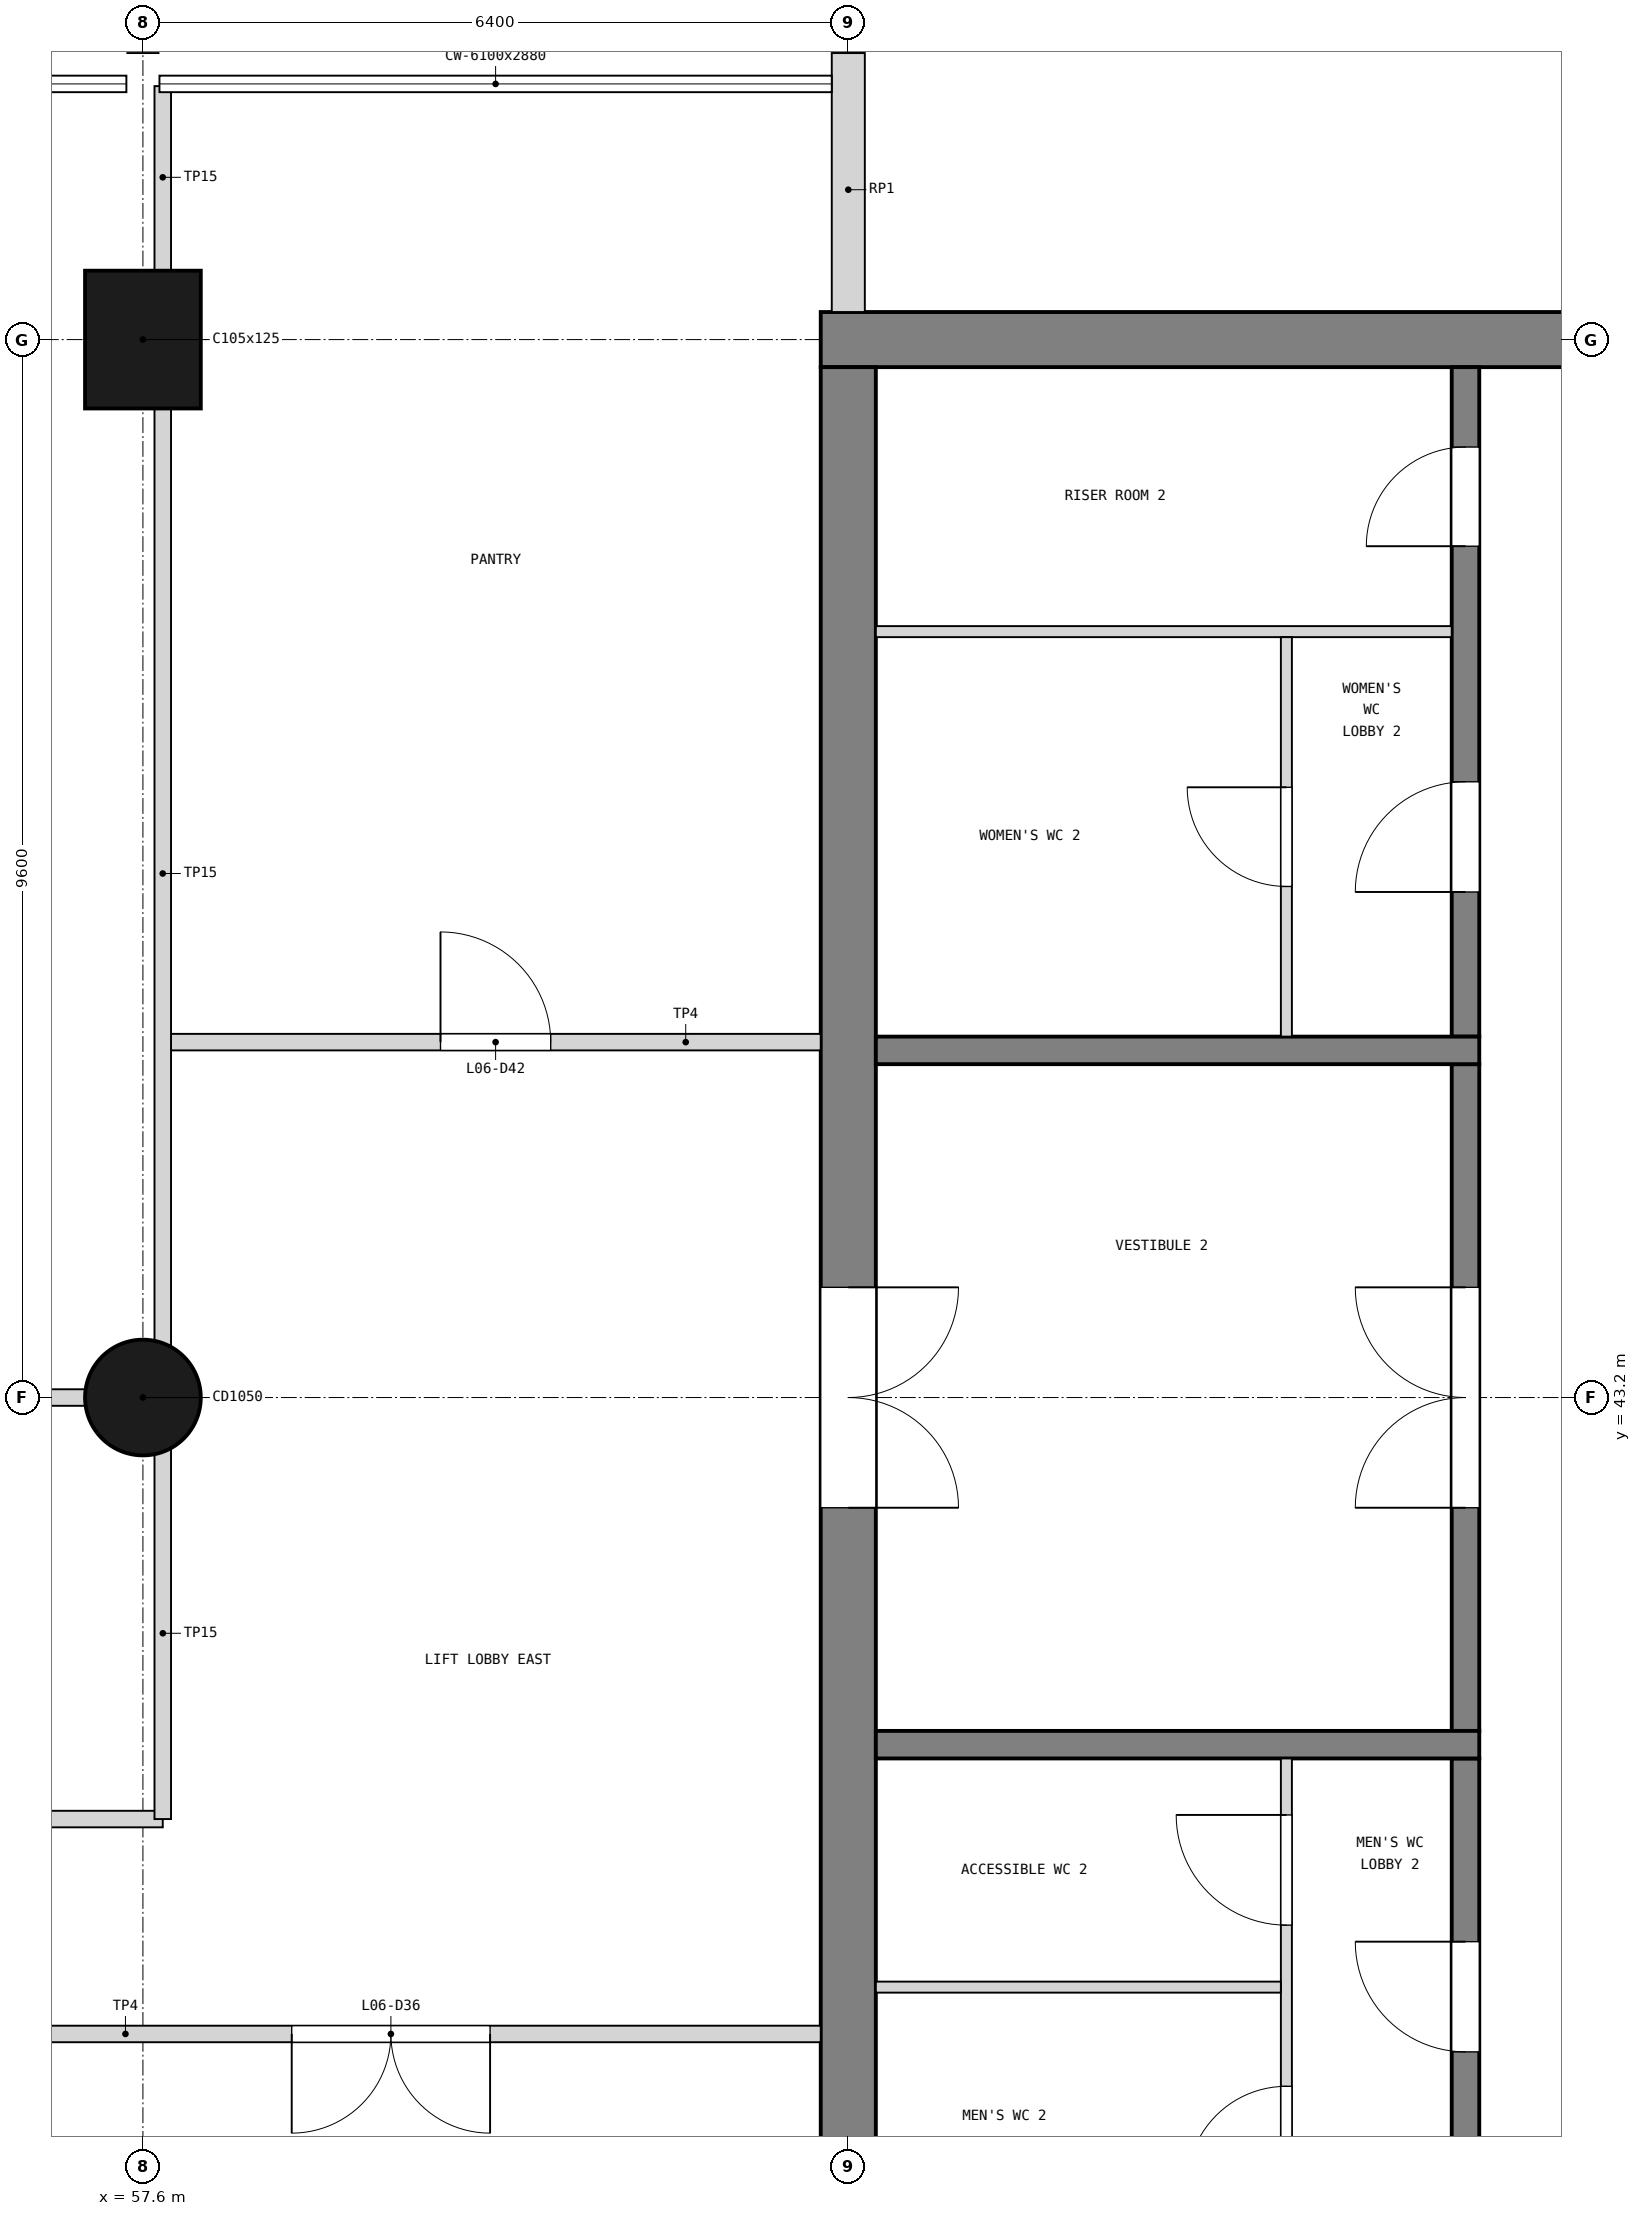
"""IFC4 building model, lengths in metres.
Left out: names, types, materials, properties, quantities, classifications, styles, units other than length and angle.
Written with IfcOpenShell. Run it as: python <this file> out.ifc"""

import sys

from ifc_helpers import new_model, si_unit, direction, frame, frame_2d, origin, origin_2d, place, context, subcontext, project, spatial, rectangle, circle, extrude, element, fill, save


model = new_model("IFC4")
c1 = context("Model", 3, precision=1e-05, world=origin(), true_north=direction((0.0, 1.0)))
c2 = subcontext(c1, "Body", "Model", "MODEL_VIEW")
j1 = project(units=[si_unit("LENGTHUNIT", "METRE"), si_unit("PLANEANGLEUNIT", "RADIAN")], contexts=[c1])
p1 = place(None, origin())
s1 = spatial("IfcSite", under=j1, at=p1, CompositionType="ELEMENT")
p2 = place(p1, origin())
s2 = spatial("IfcBuilding", under=s1, at=p2, CompositionType="ELEMENT")
p3 = place(p2, frame((0.0, 0.0, 24.9)))
s3 = spatial("IfcBuildingStorey", under=s2, at=p3, CompositionType="ELEMENT", Elevation=24.9)
p4 = place(p3, frame((63.75, 52.8, 0.0), z_axis=(0.0, 0.0, 1.0), x_axis=(1.0, 0.0, 0.0)))
e1 = element("IfcWall", 1, at=p4, inside=s3, PredefinedType="SHEAR", context=c2, shape_type="SweptSolid", body=[
    extrude(rectangle(XDim=13.3, YDim=0.5, at=frame_2d((6.65, 0.0))), origin(), (0.0, 0.0, 1.0), 3.9),
])
p5 = place(p4, frame((11.05, 0.0, 1.0)))
e2 = element("IfcOpeningElement", 2, at=p5, cuts=e1, PredefinedType="OPENING", context=c2, shape_type="SweptSolid", body=[
    extrude(rectangle(XDim=0.4, YDim=2.0, at=frame_2d((0.2, 1.0))), frame((0.0, 0.26, 0.0), z_axis=(0.0, -1.0, 0.0), x_axis=(1.0, 0.0, 0.0)), (0.0, 0.0, 1.0), 0.52),
])
p6 = place(p3, frame((64.0, 33.85, 0.0), z_axis=(0.0, 0.0, 1.0), x_axis=(0.0, 1.0, 0.0)))
e3 = element("IfcWall", 3, at=p6, inside=s3, PredefinedType="SHEAR", context=c2, shape_type="SweptSolid", body=[
    extrude(rectangle(XDim=18.7, YDim=0.5, at=frame_2d((9.35, 0.0))), origin(), (0.0, 0.0, 1.0), 3.9),
])
p7 = place(p6, frame((8.35, 0.0, 0.0)))
e4 = element("IfcOpeningElement", 4, at=p7, cuts=e3, PredefinedType="OPENING", context=c2, shape_type="SweptSolid", body=[
    extrude(rectangle(XDim=2.0, YDim=2.1, at=frame_2d((1.0, 1.05))), frame((0.0, 0.26, 0.0), z_axis=(0.0, -1.0, 0.0), x_axis=(1.0, 0.0, 0.0)), (0.0, 0.0, 1.0), 0.52),
])
p8 = place(p3, frame((57.6, 43.2, 0.0), z_axis=(0.0, 0.0, 1.0), x_axis=(1.0, 0.0, 0.0)))
e5 = element("IfcColumn", 5, at=p8, inside=s3, PredefinedType="COLUMN", context=c2, shape_type="SweptSolid", body=[
    extrude(circle(Radius=0.525, at=origin_2d()), origin(), (0.0, 0.0, 1.0), 3.9),
])
p9 = place(p3, frame((57.6, 52.8, 0.0), z_axis=(0.0, 0.0, 1.0), x_axis=(1.0, 0.0, 0.0)))
e6 = element("IfcColumn", 6, at=p9, inside=s3, PredefinedType="COLUMN", context=c2, shape_type="SweptSolid", body=[
    extrude(rectangle(XDim=1.05, YDim=1.25, at=origin_2d()), origin(), (0.0, 0.0, 1.0), 3.9),
])
p10 = place(p3, frame((64.0, 53.05, 0.0), z_axis=(0.0, 0.0, 1.0), x_axis=(0.0, 1.0, 0.0)))
e7 = element("IfcWall", 7, at=p10, inside=s3, PredefinedType="SOLIDWALL", context=c2, shape_type="SweptSolid", body=[
    extrude(rectangle(XDim=2.35, YDim=0.3, at=frame_2d((1.175, 0.0))), origin(), (0.0, 0.0, 1.0), 2.88),
])
p11 = place(p3, frame((69.6, 33.85, 0.0), z_axis=(0.0, 0.0, 1.0), x_axis=(0.0, 1.0, 0.0)))
e8 = element("IfcWall", 8, at=p11, inside=s3, PredefinedType="SOLIDWALL", context=c2, shape_type="SweptSolid", body=[
    extrude(rectangle(XDim=6.075, YDim=0.25, at=frame_2d((3.038, 0.0))), origin(), (0.0, 0.0, 1.0), 3.6),
])
p12 = place(p11, frame((0.425, 0.0, 0.0)))
e9 = element("IfcOpeningElement", 9, at=p12, cuts=e8, PredefinedType="OPENING", context=c2, shape_type="SweptSolid", body=[
    extrude(rectangle(XDim=0.8, YDim=2.1, at=frame_2d((0.4, 1.05))), frame((0.0, 0.135, 0.0), z_axis=(0.0, -1.0, 0.0), x_axis=(1.0, 0.0, 0.0)), (0.0, 0.0, 1.0), 0.27),
])
p13 = place(p11, frame((3.413, 0.0, 0.0)))
e10 = element("IfcOpeningElement", 10, at=p13, cuts=e8, PredefinedType="OPENING", context=c2, shape_type="SweptSolid", body=[
    extrude(rectangle(XDim=1.0, YDim=2.1, at=frame_2d((0.5, 1.05))), frame((0.0, 0.135, 0.0), z_axis=(0.0, -1.0, 0.0), x_axis=(1.0, 0.0, 0.0)), (0.0, 0.0, 1.0), 0.27),
])
p14 = place(p3, frame((69.6, 40.175, 0.0), z_axis=(0.0, 0.0, 1.0), x_axis=(0.0, 1.0, 0.0)))
e11 = element("IfcWall", 11, at=p14, inside=s3, PredefinedType="SOLIDWALL", context=c2, shape_type="SweptSolid", body=[
    extrude(rectangle(XDim=6.05, YDim=0.25, at=frame_2d((3.025, 0.0))), origin(), (0.0, 0.0, 1.0), 3.6),
])
p15 = place(p14, frame((2.025, 0.0, 0.0)))
e12 = element("IfcOpeningElement", 12, at=p15, cuts=e11, PredefinedType="OPENING", context=c2, shape_type="SweptSolid", body=[
    extrude(rectangle(XDim=2.0, YDim=2.1, at=frame_2d((1.0, 1.05))), frame((0.0, 0.135, 0.0), z_axis=(0.0, -1.0, 0.0), x_axis=(1.0, 0.0, 0.0)), (0.0, 0.0, 1.0), 0.27),
])
p16 = place(p3, frame((69.6, 46.475, 0.0), z_axis=(0.0, 0.0, 1.0), x_axis=(0.0, 1.0, 0.0)))
e13 = element("IfcWall", 13, at=p16, inside=s3, PredefinedType="SOLIDWALL", context=c2, shape_type="SweptSolid", body=[
    extrude(rectangle(XDim=6.075, YDim=0.25, at=frame_2d((3.038, 0.0))), origin(), (0.0, 0.0, 1.0), 3.6),
])
p17 = place(p16, frame((1.312, 0.0, 0.0)))
e14 = element("IfcOpeningElement", 14, at=p17, cuts=e13, PredefinedType="OPENING", context=c2, shape_type="SweptSolid", body=[
    extrude(rectangle(XDim=1.0, YDim=2.1, at=frame_2d((0.5, 1.05))), frame((0.0, 0.135, 0.0), z_axis=(0.0, -1.0, 0.0), x_axis=(1.0, 0.0, 0.0)), (0.0, 0.0, 1.0), 0.27),
])
p18 = place(p16, frame((4.45, 0.0, 0.0)))
e15 = element("IfcOpeningElement", 15, at=p18, cuts=e13, PredefinedType="OPENING", context=c2, shape_type="SweptSolid", body=[
    extrude(rectangle(XDim=0.9, YDim=2.1, at=frame_2d((0.45, 1.05))), frame((0.0, 0.135, 0.0), z_axis=(0.0, -1.0, 0.0), x_axis=(1.0, 0.0, 0.0)), (0.0, 0.0, 1.0), 0.27),
])
for number, where, z_axis, x_axis in (
    (16, (69.725, 40.05, 0.0), (0.0, 0.0, 1.0), (-1.0, 0.0, 0.0)),
    (17, (69.725, 46.35, 0.0), (0.0, 0.0, 1.0), (-1.0, 0.0, 0.0)),
):
    element("IfcWall", number, at=place(p3, frame(where, z_axis=z_axis, x_axis=x_axis)), inside=s3, PredefinedType="SOLIDWALL", context=c2, shape_type="SweptSolid", body=[
        extrude(rectangle(XDim=5.475, YDim=0.25, at=frame_2d((2.738, 0.0))), origin(), (0.0, 0.0, 1.0), 3.6),
    ])
p19 = place(p3, frame((67.975, 35.6, 0.0), z_axis=(0.0, 0.0, 1.0), x_axis=(0.0, 1.0, 0.0)))
e18 = element("IfcWall", 18, at=p19, inside=s3, PredefinedType="PARTITIONING", context=c2, shape_type="SweptSolid", body=[
    extrude(rectangle(XDim=4.325, YDim=0.1, at=frame_2d((2.163, 0.0))), origin(), (0.0, 0.0, 1.0), 3.6),
])
p20 = place(p19, frame((0.45, 0.0, 0.0)))
e19 = element("IfcOpeningElement", 19, at=p20, cuts=e18, PredefinedType="OPENING", context=c2, shape_type="SweptSolid", body=[
    extrude(rectangle(XDim=0.9, YDim=2.1, at=frame_2d((0.45, 1.05))), frame((0.0, 0.06, 0.0), z_axis=(0.0, -1.0, 0.0), x_axis=(1.0, 0.0, 0.0)), (0.0, 0.0, 1.0), 0.12),
])
p21 = place(p19, frame((2.812, 0.0, 0.0)))
e20 = element("IfcOpeningElement", 20, at=p21, cuts=e18, PredefinedType="OPENING", context=c2, shape_type="SweptSolid", body=[
    extrude(rectangle(XDim=1.0, YDim=2.1, at=frame_2d((0.5, 1.05))), frame((0.0, 0.06, 0.0), z_axis=(0.0, -1.0, 0.0), x_axis=(1.0, 0.0, 0.0)), (0.0, 0.0, 1.0), 0.12),
])
p22 = place(p3, frame((67.925, 37.85, 0.0), z_axis=(0.0, 0.0, 1.0), x_axis=(-1.0, 0.0, 0.0)))
e21 = element("IfcWall", 21, at=p22, inside=s3, PredefinedType="PARTITIONING", context=c2, shape_type="SweptSolid", body=[
    extrude(rectangle(XDim=3.675, YDim=0.1, at=frame_2d((1.837, 0.0))), origin(), (0.0, 0.0, 1.0), 3.6),
])
p23 = place(p3, frame((69.475, 50.15, 0.0), z_axis=(0.0, 0.0, 1.0), x_axis=(-1.0, 0.0, 0.0)))
e22 = element("IfcWall", 22, at=p23, inside=s3, PredefinedType="PARTITIONING", context=c2, shape_type="SweptSolid", body=[
    extrude(rectangle(XDim=5.225, YDim=0.1, at=frame_2d((2.613, 0.0))), origin(), (0.0, 0.0, 1.0), 3.6),
])
p24 = place(p3, frame((67.975, 46.475, 0.0), z_axis=(0.0, 0.0, 1.0), x_axis=(0.0, 1.0, 0.0)))
e23 = element("IfcWall", 23, at=p24, inside=s3, PredefinedType="PARTITIONING", context=c2, shape_type="SweptSolid", body=[
    extrude(rectangle(XDim=3.625, YDim=0.1, at=frame_2d((1.812, 0.0))), origin(), (0.0, 0.0, 1.0), 3.6),
])
p25 = place(p24, frame((1.363, 0.0, 0.0)))
e24 = element("IfcOpeningElement", 24, at=p25, cuts=e23, PredefinedType="OPENING", context=c2, shape_type="SweptSolid", body=[
    extrude(rectangle(XDim=0.9, YDim=2.1, at=frame_2d((0.45, 1.05))), frame((0.0, 0.06, 0.0), z_axis=(0.0, -1.0, 0.0), x_axis=(1.0, 0.0, 0.0)), (0.0, 0.0, 1.0), 0.12),
])
p26 = place(p3, frame((55.91, 37.425, 0.0), z_axis=(0.0, 0.0, 1.0), x_axis=(1.0, 0.0, 0.0)))
e25 = element("IfcWall", 25, at=p26, inside=s3, PredefinedType="PARTITIONING", context=c2, shape_type="SweptSolid", body=[
    extrude(rectangle(XDim=7.84, YDim=0.15, at=frame_2d((3.92, 0.0))), origin(), (0.0, 0.0, 1.0), 3.68),
])
p27 = place(p26, frame((3.04, 0.0, 0.0)))
e26 = element("IfcOpeningElement", 26, at=p27, cuts=e25, PredefinedType="OPENING", context=c2, shape_type="SweptSolid", body=[
    extrude(rectangle(XDim=1.8, YDim=2.1, at=frame_2d((0.9, 1.05))), frame((0.0, 0.085, 0.0), z_axis=(0.0, -1.0, 0.0), x_axis=(1.0, 0.0, 0.0)), (0.0, 0.0, 1.0), 0.17),
])
p28 = place(p3, frame((51.38, 39.375, 0.0), z_axis=(0.0, 0.0, 1.0), x_axis=(1.0, 0.0, 0.0)))
e27 = element("IfcWall", 27, at=p28, inside=s3, PredefinedType="PARTITIONING", context=c2, shape_type="SweptSolid", body=[
    extrude(rectangle(XDim=6.4, YDim=0.15, at=frame_2d((3.2, 0.0))), origin(), (0.0, 0.0, 1.0), 3.68),
])
p29 = place(p28, frame((2.72, 0.0, 0.0)))
e28 = element("IfcOpeningElement", 28, at=p29, cuts=e27, PredefinedType="OPENING", context=c2, shape_type="SweptSolid", body=[
    extrude(rectangle(XDim=1.0, YDim=2.1, at=frame_2d((0.5, 1.05))), frame((0.0, 0.085, 0.0), z_axis=(0.0, -1.0, 0.0), x_axis=(1.0, 0.0, 0.0)), (0.0, 0.0, 1.0), 0.17),
])
p30 = place(p3, frame((31.82, 43.2, 0.0), z_axis=(0.0, 0.0, 1.0), x_axis=(1.0, 0.0, 0.0)))
e29 = element("IfcWall", 29, at=p30, inside=s3, PredefinedType="PARTITIONING", context=c2, shape_type="SweptSolid", body=[
    extrude(rectangle(XDim=25.96, YDim=0.15, at=frame_2d((12.98, 0.0))), origin(), (0.0, 0.0, 1.0), 2.88),
])
p31 = place(p30, frame((13.825, 0.0, 0.0)))
e30 = element("IfcOpeningElement", 30, at=p31, cuts=e29, PredefinedType="OPENING", context=c2, shape_type="SweptSolid", body=[
    extrude(rectangle(XDim=1.8, YDim=2.1, at=frame_2d((0.9, 1.05))), frame((0.0, 0.085, 0.0), z_axis=(0.0, -1.0, 0.0), x_axis=(1.0, 0.0, 0.0)), (0.0, 0.0, 1.0), 0.17),
])
p32 = place(p30, frame((16.725, 0.0, 0.0)))
e31 = element("IfcOpeningElement", 31, at=p32, cuts=e29, PredefinedType="OPENING", context=c2, shape_type="SweptSolid", body=[
    extrude(rectangle(XDim=1.8, YDim=2.1, at=frame_2d((0.9, 1.05))), frame((0.0, 0.085, 0.0), z_axis=(0.0, -1.0, 0.0), x_axis=(1.0, 0.0, 0.0)), (0.0, 0.0, 1.0), 0.17),
])
p33 = place(p3, frame((57.78, 46.425, 0.0), z_axis=(0.0, 0.0, 1.0), x_axis=(1.0, 0.0, 0.0)))
e32 = element("IfcWall", 32, at=p33, inside=s3, PredefinedType="PARTITIONING", context=c2, shape_type="SweptSolid", body=[
    extrude(rectangle(XDim=5.97, YDim=0.15, at=frame_2d((2.985, 0.0))), origin(), (0.0, 0.0, 1.0), 3.68),
])
p34 = place(p33, frame((2.52, 0.0, 0.0)))
e33 = element("IfcOpeningElement", 33, at=p34, cuts=e32, PredefinedType="OPENING", context=c2, shape_type="SweptSolid", body=[
    extrude(rectangle(XDim=1.0, YDim=2.1, at=frame_2d((0.5, 1.05))), frame((0.0, 0.085, 0.0), z_axis=(0.0, -1.0, 0.0), x_axis=(1.0, 0.0, 0.0)), (0.0, 0.0, 1.0), 0.17),
])
p35 = place(p3, frame((57.78, 39.375, 0.0), z_axis=(0.0, 0.0, 1.0), x_axis=(0.0, 1.0, 0.0)))
e34 = element("IfcWall", 34, at=p35, inside=s3, PredefinedType="PARTITIONING", context=c2, shape_type="SweptSolid", body=[
    extrude(rectangle(XDim=3.352, YDim=0.15, at=frame_2d((1.676, 0.0))), origin(), (0.0, 0.0, 1.0), 2.78),
])
p36 = place(p3, frame((57.78, 43.673, 0.0), z_axis=(0.0, 0.0, 1.0), x_axis=(0.0, 1.0, 0.0)))
e35 = element("IfcWall", 35, at=p36, inside=s3, PredefinedType="PARTITIONING", context=c2, shape_type="SweptSolid", body=[
    extrude(rectangle(XDim=8.522, YDim=0.15, at=frame_2d((4.261, 0.0))), origin(), (0.0, 0.0, 1.0), 2.78),
])
p37 = place(p3, frame((57.78, 53.405, 0.0), z_axis=(0.0, 0.0, 1.0), x_axis=(0.0, 1.0, 0.0)))
e36 = element("IfcWall", 36, at=p37, inside=s3, PredefinedType="PARTITIONING", context=c2, shape_type="SweptSolid", body=[
    extrude(rectangle(XDim=1.695, YDim=0.15, at=frame_2d((0.848, 0.0))), origin(), (0.0, 0.0, 1.0), 2.78),
])
p38 = place(p15, origin())
e37 = element("IfcDoor", 37, at=p38, inside=s3, OperationType="DOUBLE_DOOR_SINGLE_SWING", PredefinedType="DOOR", context=c2, shape_type="SweptSolid", body=[
    extrude(rectangle(XDim=2.0, YDim=2.1, at=frame_2d((1.0, 1.05))), frame((0.0, 0.025, 0.0), z_axis=(0.0, -1.0, 0.0), x_axis=(1.0, 0.0, 0.0)), (0.0, 0.0, 1.0), 0.05),
])
fill(e12, e37)
p39 = place(p7, frame((2.0, 0.0, 0.0), z_axis=(0.0, 0.0, 1.0), x_axis=(-1.0, 0.0, 0.0)))
e38 = element("IfcDoor", 38, at=p39, inside=s3, OperationType="DOUBLE_DOOR_SINGLE_SWING", PredefinedType="DOOR", context=c2, shape_type="SweptSolid", body=[
    extrude(rectangle(XDim=2.0, YDim=2.1, at=frame_2d((1.0, 1.05))), frame((0.0, 0.025, 0.0), z_axis=(0.0, -1.0, 0.0), x_axis=(1.0, 0.0, 0.0)), (0.0, 0.0, 1.0), 0.05),
])
fill(e4, e38)
p40 = place(p13, origin())
e39 = element("IfcDoor", 39, at=p40, inside=s3, OperationType="SINGLE_SWING_RIGHT", PredefinedType="DOOR", context=c2, shape_type="SweptSolid", body=[
    extrude(rectangle(XDim=1.0, YDim=2.1, at=frame_2d((0.5, 1.05))), frame((0.0, 0.025, 0.0), z_axis=(0.0, -1.0, 0.0), x_axis=(1.0, 0.0, 0.0)), (0.0, 0.0, 1.0), 0.05),
])
fill(e10, e39)
p41 = place(p20, origin())
e40 = element("IfcDoor", 40, at=p41, inside=s3, OperationType="SINGLE_SWING_LEFT", PredefinedType="DOOR", context=c2, shape_type="SweptSolid", body=[
    extrude(rectangle(XDim=0.9, YDim=2.1, at=frame_2d((0.45, 1.05))), frame((0.0, 0.025, 0.0), z_axis=(0.0, -1.0, 0.0), x_axis=(1.0, 0.0, 0.0)), (0.0, 0.0, 1.0), 0.05),
])
fill(e19, e40)
p42 = place(p21, origin())
e41 = element("IfcDoor", 41, at=p42, inside=s3, OperationType="SINGLE_SWING_RIGHT", PredefinedType="DOOR", context=c2, shape_type="SweptSolid", body=[
    extrude(rectangle(XDim=1.0, YDim=2.1, at=frame_2d((0.5, 1.05))), frame((0.0, 0.025, 0.0), z_axis=(0.0, -1.0, 0.0), x_axis=(1.0, 0.0, 0.0)), (0.0, 0.0, 1.0), 0.05),
])
fill(e20, e41)
p43 = place(p17, origin())
e42 = element("IfcDoor", 42, at=p43, inside=s3, OperationType="SINGLE_SWING_LEFT", PredefinedType="DOOR", context=c2, shape_type="SweptSolid", body=[
    extrude(rectangle(XDim=1.0, YDim=2.1, at=frame_2d((0.5, 1.05))), frame((0.0, 0.025, 0.0), z_axis=(0.0, -1.0, 0.0), x_axis=(1.0, 0.0, 0.0)), (0.0, 0.0, 1.0), 0.05),
])
fill(e14, e42)
p44 = place(p25, origin())
e43 = element("IfcDoor", 43, at=p44, inside=s3, OperationType="SINGLE_SWING_RIGHT", PredefinedType="DOOR", context=c2, shape_type="SweptSolid", body=[
    extrude(rectangle(XDim=0.9, YDim=2.1, at=frame_2d((0.45, 1.05))), frame((0.0, 0.025, 0.0), z_axis=(0.0, -1.0, 0.0), x_axis=(1.0, 0.0, 0.0)), (0.0, 0.0, 1.0), 0.05),
])
fill(e24, e43)
p45 = place(p18, origin())
e44 = element("IfcDoor", 44, at=p45, inside=s3, OperationType="SINGLE_SWING_LEFT", PredefinedType="DOOR", context=c2, shape_type="SweptSolid", body=[
    extrude(rectangle(XDim=0.9, YDim=2.1, at=frame_2d((0.45, 1.05))), frame((0.0, 0.025, 0.0), z_axis=(0.0, -1.0, 0.0), x_axis=(1.0, 0.0, 0.0)), (0.0, 0.0, 1.0), 0.05),
])
fill(e15, e44)
p46 = place(p27, frame((1.8, 0.0, 0.0), z_axis=(0.0, 0.0, 1.0), x_axis=(-1.0, 0.0, 0.0)))
e45 = element("IfcDoor", 45, at=p46, inside=s3, OperationType="DOUBLE_DOOR_SINGLE_SWING", PredefinedType="DOOR", context=c2, shape_type="SweptSolid", body=[
    extrude(rectangle(XDim=1.8, YDim=2.1, at=frame_2d((0.9, 1.05))), frame((0.0, 0.025, 0.0), z_axis=(0.0, -1.0, 0.0), x_axis=(1.0, 0.0, 0.0)), (0.0, 0.0, 1.0), 0.05),
])
fill(e26, e45)
p47 = place(p34, origin())
e46 = element("IfcDoor", 46, at=p47, inside=s3, OperationType="SINGLE_SWING_LEFT", PredefinedType="DOOR", context=c2, shape_type="SweptSolid", body=[
    extrude(rectangle(XDim=1.0, YDim=2.1, at=frame_2d((0.5, 1.05))), frame((0.0, 0.025, 0.0), z_axis=(0.0, -1.0, 0.0), x_axis=(1.0, 0.0, 0.0)), (0.0, 0.0, 1.0), 0.05),
])
fill(e33, e46)
save(model, sys.argv[1])
